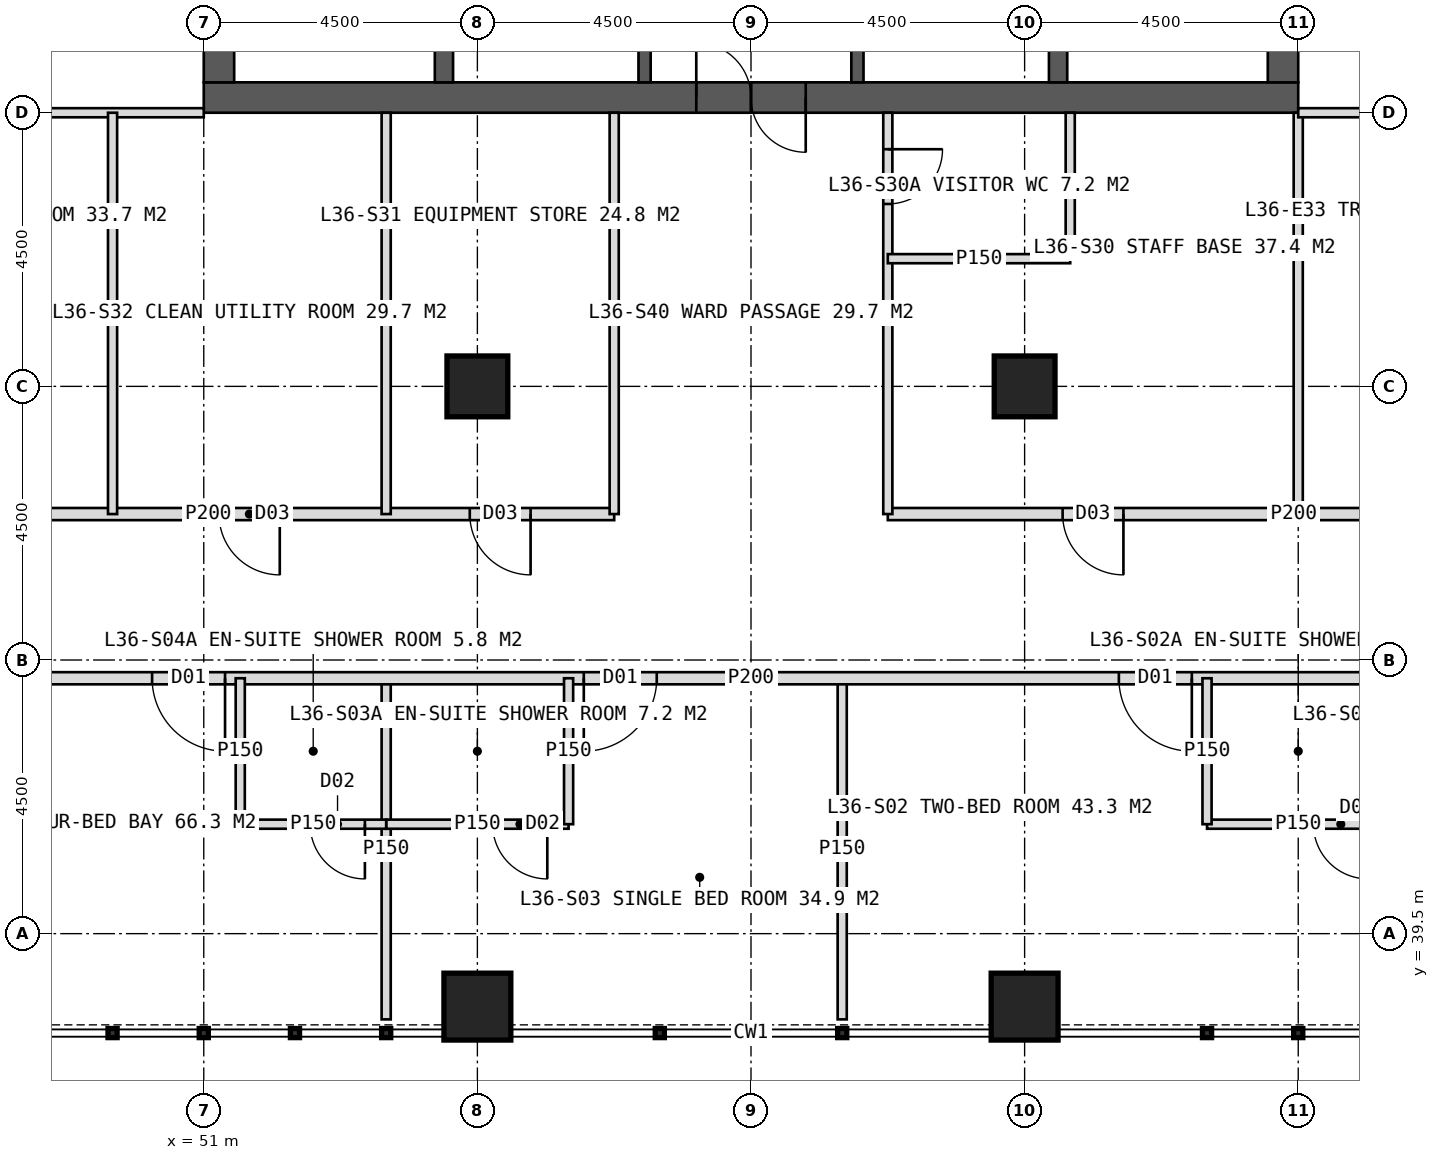
"""IFC4 building model, lengths in metres.
Left out: names, types, materials, properties, quantities, classifications, styles, units other than length and angle.
Written with IfcOpenShell. Run it as: python <this file> out.ifc"""

import sys

from ifc_helpers import new_model, si_unit, direction, frame, frame_2d, origin, origin_2d, place, context, subcontext, project, spatial, rectangle, hollow_rectangle, extrude, element, fill, save


model = new_model("IFC4")
c1 = context("Model", 3, precision=1e-05, world=origin(), true_north=direction((0.0, 1.0)))
c2 = subcontext(c1, "Body", "Model", "MODEL_VIEW")
j1 = project(units=[si_unit("LENGTHUNIT", "METRE"), si_unit("PLANEANGLEUNIT", "RADIAN")], contexts=[c1])
p1 = place(None, origin())
s1 = spatial("IfcSite", under=j1, at=p1, CompositionType="ELEMENT")
p2 = place(p1, origin())
s2 = spatial("IfcBuilding", under=s1, at=p2, CompositionType="ELEMENT")
p3 = place(p2, frame((0.0, 0.0, 152.0)))
s3 = spatial("IfcBuildingStorey", under=s2, at=p3, CompositionType="ELEMENT", Elevation=152.0)
p4 = place(p3, frame((51.0, 53.25, 0.0), z_axis=(0.0, 0.0, 1.0), x_axis=(1.0, 0.0, 0.0)))
e1 = element("IfcWall", 1, at=p4, inside=s3, PredefinedType="SHEAR", context=c2, shape_type="SweptSolid", body=[
    extrude(rectangle(XDim=18.0, YDim=0.5, at=frame_2d((9.0, 0.0))), origin(), (0.0, 0.0, 1.0), 4.0),
])
p5 = place(p4, frame((8.1, 0.0, 0.0)))
e2 = element("IfcOpeningElement", 2, at=p5, cuts=e1, PredefinedType="OPENING", context=c2, shape_type="SweptSolid", body=[
    extrude(rectangle(XDim=1.8, YDim=2.2, at=frame_2d((0.9, 1.1))), frame((0.0, 0.26, 0.0), z_axis=(0.0, -1.0, 0.0), x_axis=(1.0, 0.0, 0.0)), (0.0, 0.0, 1.0), 0.52),
])
p6 = place(p3, frame((51.25, 53.5, 0.0), z_axis=(0.0, 0.0, 1.0), x_axis=(0.0, 1.0, 0.0)))
e3 = element("IfcWall", 3, at=p6, inside=s3, PredefinedType="SHEAR", context=c2, shape_type="SweptSolid", body=[
    extrude(rectangle(XDim=17.0, YDim=0.5, at=frame_2d((8.5, 0.0))), origin(), (0.0, 0.0, 1.0), 4.0),
])
p7 = place(p6, frame((6.0, 0.0, 0.0)))
e4 = element("IfcOpeningElement", 4, at=p7, cuts=e3, PredefinedType="OPENING", context=c2, shape_type="SweptSolid", body=[
    extrude(rectangle(XDim=1.5, YDim=2.2, at=frame_2d((0.75, 1.1))), frame((0.0, 0.26, 0.0), z_axis=(0.0, -1.0, 0.0), x_axis=(1.0, 0.0, 0.0)), (0.0, 0.0, 1.0), 0.52),
])
p8 = place(p3, frame((68.75, 53.5, 0.0), z_axis=(0.0, 0.0, 1.0), x_axis=(0.0, 1.0, 0.0)))
e5 = element("IfcWall", 5, at=p8, inside=s3, PredefinedType="SHEAR", context=c2, shape_type="SweptSolid", body=[
    extrude(rectangle(XDim=17.0, YDim=0.5, at=frame_2d((8.5, 0.0))), origin(), (0.0, 0.0, 1.0), 4.0),
])
p9 = place(p8, frame((9.5, 0.0, 0.0)))
e6 = element("IfcOpeningElement", 6, at=p9, cuts=e5, PredefinedType="OPENING", context=c2, shape_type="SweptSolid", body=[
    extrude(rectangle(XDim=1.5, YDim=2.2, at=frame_2d((0.75, 1.1))), frame((0.0, 0.26, 0.0), z_axis=(0.0, -1.0, 0.0), x_axis=(1.0, 0.0, 0.0)), (0.0, 0.0, 1.0), 0.52),
])
for number, where, z_axis, x_axis in (
    (7, (54.95, 53.5, 0.0), (0.0, 0.0, 1.0), (0.0, 1.0, 0.0)),
    (8, (65.05, 53.5, 0.0), (0.0, 0.0, 1.0), (0.0, 1.0, 0.0)),
):
    element("IfcWall", number, at=place(p3, frame(where, z_axis=z_axis, x_axis=x_axis)), inside=s3, PredefinedType="SHEAR", context=c2, shape_type="SweptSolid", body=[
        extrude(rectangle(XDim=17.0, YDim=0.3, at=frame_2d((8.5, 0.0))), origin(), (0.0, 0.0, 1.0), 4.0),
    ])
p10 = place(p3, frame((58.25, 53.5, 0.0), z_axis=(0.0, 0.0, 1.0), x_axis=(0.0, 1.0, 0.0)))
e9 = element("IfcWall", 9, at=p10, inside=s3, PredefinedType="SHEAR", context=c2, shape_type="SweptSolid", body=[
    extrude(rectangle(XDim=17.0, YDim=0.2, at=frame_2d((8.5, 0.0))), origin(), (0.0, 0.0, 1.0), 4.0),
])
p11 = place(p10, frame((1.375, 0.0, 0.0)))
e10 = element("IfcOpeningElement", 10, at=p11, cuts=e9, PredefinedType="OPENING", context=c2, shape_type="SweptSolid", body=[
    extrude(rectangle(XDim=1.4, YDim=2.2, at=frame_2d((0.7, 1.1))), frame((0.0, 0.11, 0.0), z_axis=(0.0, -1.0, 0.0), x_axis=(1.0, 0.0, 0.0)), (0.0, 0.0, 1.0), 0.22),
])
p12 = place(p10, frame((5.675, 0.0, 0.0)))
e11 = element("IfcOpeningElement", 11, at=p12, cuts=e9, PredefinedType="OPENING", context=c2, shape_type="SweptSolid", body=[
    extrude(rectangle(XDim=1.4, YDim=2.2, at=frame_2d((0.7, 1.1))), frame((0.0, 0.11, 0.0), z_axis=(0.0, -1.0, 0.0), x_axis=(1.0, 0.0, 0.0)), (0.0, 0.0, 1.0), 0.22),
])
p13 = place(p3, frame((61.75, 53.5, 0.0), z_axis=(0.0, 0.0, 1.0), x_axis=(0.0, 1.0, 0.0)))
e12 = element("IfcWall", 12, at=p13, inside=s3, PredefinedType="SHEAR", context=c2, shape_type="SweptSolid", body=[
    extrude(rectangle(XDim=17.0, YDim=0.2, at=frame_2d((8.5, 0.0))), origin(), (0.0, 0.0, 1.0), 4.0),
])
p14 = place(p13, frame((1.375, 0.0, 0.0)))
e13 = element("IfcOpeningElement", 13, at=p14, cuts=e12, PredefinedType="OPENING", context=c2, shape_type="SweptSolid", body=[
    extrude(rectangle(XDim=1.4, YDim=2.2, at=frame_2d((0.7, 1.1))), frame((0.0, 0.11, 0.0), z_axis=(0.0, -1.0, 0.0), x_axis=(1.0, 0.0, 0.0)), (0.0, 0.0, 1.0), 0.22),
])
p15 = place(p13, frame((5.675, 0.0, 0.0)))
e14 = element("IfcOpeningElement", 14, at=p15, cuts=e12, PredefinedType="OPENING", context=c2, shape_type="SweptSolid", body=[
    extrude(rectangle(XDim=1.4, YDim=2.2, at=frame_2d((0.7, 1.1))), frame((0.0, 0.11, 0.0), z_axis=(0.0, -1.0, 0.0), x_axis=(1.0, 0.0, 0.0)), (0.0, 0.0, 1.0), 0.22),
])
for number, where, z_axis, x_axis in (
    (15, (55.5, 48.5, 0.0), (0.0, 0.0, 1.0), (1.0, 0.0, 0.0)),
    (16, (64.5, 48.5, 0.0), (0.0, 0.0, 1.0), (1.0, 0.0, 0.0)),
):
    element("IfcColumn", number, at=place(p3, frame(where, z_axis=z_axis, x_axis=x_axis)), inside=s3, PredefinedType="COLUMN", context=c2, shape_type="SweptSolid", body=[
        extrude(hollow_rectangle(XDim=1.0, YDim=1.0, WallThickness=0.1, at=origin_2d()), origin(), (0.0, 0.0, 1.0), 4.0),
    ])
for number, where, z_axis, x_axis in (
    (17, (55.5, 38.3, 0.0), (0.0, 0.0, 1.0), (1.0, 0.0, 0.0)),
    (18, (64.5, 38.3, 0.0), (0.0, 0.0, 1.0), (1.0, 0.0, 0.0)),
):
    element("IfcColumn", number, at=place(p3, frame(where, z_axis=z_axis, x_axis=x_axis)), inside=s3, PredefinedType="COLUMN", context=c2, shape_type="SweptSolid", body=[
        extrude(hollow_rectangle(XDim=1.1, YDim=1.1, WallThickness=0.1, at=origin_2d()), origin(), (0.0, 0.0, 1.0), 4.0),
    ])
p16 = place(p3, frame((51.0, 53.0, 0.0), z_axis=(0.0, 0.0, 1.0), x_axis=(-1.0, 0.0, 0.0)))
e19 = element("IfcWall", 19, at=p16, inside=s3, PredefinedType="PARTITIONING", context=c2, shape_type="SweptSolid", body=[
    extrude(rectangle(XDim=6.6, YDim=0.15, at=frame_2d((3.3, 0.0))), origin(), (0.0, 0.0, 1.0), 3.75),
])
for number, where, z_axis, x_axis in (
    (20, (61.5, 43.7, 0.0), (0.0, 0.0, 1.0), (0.0, -1.0, 0.0)),
    (21, (54.0, 43.7, 0.0), (0.0, 0.0, 1.0), (0.0, -1.0, 0.0)),
):
    element("IfcWall", number, at=place(p3, frame(where, z_axis=z_axis, x_axis=x_axis)), inside=s3, PredefinedType="PARTITIONING", context=c2, shape_type="SweptSolid", body=[
        extrude(rectangle(XDim=5.61, YDim=0.15, at=frame_2d((2.805, 0.0))), origin(), (0.0, 0.0, 1.0), 3.75),
    ])
p17 = place(p3, frame((78.3, 43.7, 0.0), z_axis=(0.0, 0.0, 1.0), x_axis=(-1.0, 0.0, 0.0)))
e22 = element("IfcWall", 22, at=p17, inside=s3, PredefinedType="PARTITIONING", context=c2, shape_type="SweptSolid", body=[
    extrude(rectangle(XDim=36.6, YDim=0.2, at=frame_2d((18.3, 0.0))), origin(), (0.0, 0.0, 1.0), 3.75),
])
p18 = place(p17, frame((3.35, 0.0, 0.0)))
e23 = element("IfcOpeningElement", 23, at=p18, cuts=e22, PredefinedType="OPENING", context=c2, shape_type="SweptSolid", body=[
    extrude(rectangle(XDim=1.2, YDim=2.2, at=frame_2d((0.6, 1.1))), frame((0.0, 0.11, 0.0), z_axis=(0.0, -1.0, 0.0), x_axis=(1.0, 0.0, 0.0)), (0.0, 0.0, 1.0), 0.22),
])
p19 = place(p17, frame((11.05, 0.0, 0.0)))
e24 = element("IfcOpeningElement", 24, at=p19, cuts=e22, PredefinedType="OPENING", context=c2, shape_type="SweptSolid", body=[
    extrude(rectangle(XDim=1.2, YDim=2.2, at=frame_2d((0.6, 1.1))), frame((0.0, 0.11, 0.0), z_axis=(0.0, -1.0, 0.0), x_axis=(1.0, 0.0, 0.0)), (0.0, 0.0, 1.0), 0.22),
])
p20 = place(p17, frame((19.85, 0.0, 0.0)))
e25 = element("IfcOpeningElement", 25, at=p20, cuts=e22, PredefinedType="OPENING", context=c2, shape_type="SweptSolid", body=[
    extrude(rectangle(XDim=1.2, YDim=2.2, at=frame_2d((0.6, 1.1))), frame((0.0, 0.11, 0.0), z_axis=(0.0, -1.0, 0.0), x_axis=(1.0, 0.0, 0.0)), (0.0, 0.0, 1.0), 0.22),
])
p21 = place(p17, frame((26.95, 0.0, 0.0)))
e26 = element("IfcOpeningElement", 26, at=p21, cuts=e22, PredefinedType="OPENING", context=c2, shape_type="SweptSolid", body=[
    extrude(rectangle(XDim=1.2, YDim=2.2, at=frame_2d((0.6, 1.1))), frame((0.0, 0.11, 0.0), z_axis=(0.0, -1.0, 0.0), x_axis=(1.0, 0.0, 0.0)), (0.0, 0.0, 1.0), 0.22),
])
p22 = place(p3, frame((70.5, 41.3, 0.0), z_axis=(0.0, 0.0, 1.0), x_axis=(-1.0, 0.0, 0.0)))
e27 = element("IfcWall", 27, at=p22, inside=s3, PredefinedType="PARTITIONING", context=c2, shape_type="SweptSolid", body=[
    extrude(rectangle(XDim=3.0, YDim=0.15, at=frame_2d((1.5, 0.0))), origin(), (0.0, 0.0, 1.0), 3.75),
])
p23 = place(p22, frame((0.35, 0.0, 0.0)))
e28 = element("IfcOpeningElement", 28, at=p23, cuts=e27, PredefinedType="OPENING", context=c2, shape_type="SweptSolid", body=[
    extrude(rectangle(XDim=0.9, YDim=2.1, at=frame_2d((0.45, 1.05))), frame((0.0, 0.085, 0.0), z_axis=(0.0, -1.0, 0.0), x_axis=(1.0, 0.0, 0.0)), (0.0, 0.0, 1.0), 0.17),
])
p24 = place(p3, frame((67.5, 43.7, 0.0), z_axis=(0.0, 0.0, 1.0), x_axis=(0.0, -1.0, 0.0)))
e29 = element("IfcWall", 29, at=p24, inside=s3, PredefinedType="PARTITIONING", context=c2, shape_type="SweptSolid", body=[
    extrude(rectangle(XDim=2.4, YDim=0.15, at=frame_2d((1.2, 0.0))), origin(), (0.0, 0.0, 1.0), 3.75),
])
p25 = place(p3, frame((57.0, 41.3, 0.0), z_axis=(0.0, 0.0, 1.0), x_axis=(-1.0, 0.0, 0.0)))
e30 = element("IfcWall", 30, at=p25, inside=s3, PredefinedType="PARTITIONING", context=c2, shape_type="SweptSolid", body=[
    extrude(rectangle(XDim=3.0, YDim=0.15, at=frame_2d((1.5, 0.0))), origin(), (0.0, 0.0, 1.0), 3.75),
])
p26 = place(p25, frame((0.35, 0.0, 0.0)))
e31 = element("IfcOpeningElement", 31, at=p26, cuts=e30, PredefinedType="OPENING", context=c2, shape_type="SweptSolid", body=[
    extrude(rectangle(XDim=0.9, YDim=2.1, at=frame_2d((0.45, 1.05))), frame((0.0, 0.085, 0.0), z_axis=(0.0, -1.0, 0.0), x_axis=(1.0, 0.0, 0.0)), (0.0, 0.0, 1.0), 0.17),
])
p27 = place(p3, frame((57.0, 43.7, 0.0), z_axis=(0.0, 0.0, 1.0), x_axis=(0.0, -1.0, 0.0)))
e32 = element("IfcWall", 32, at=p27, inside=s3, PredefinedType="PARTITIONING", context=c2, shape_type="SweptSolid", body=[
    extrude(rectangle(XDim=2.4, YDim=0.15, at=frame_2d((1.2, 0.0))), origin(), (0.0, 0.0, 1.0), 3.75),
])
p28 = place(p3, frame((54.0, 41.3, 0.0), z_axis=(0.0, 0.0, 1.0), x_axis=(-1.0, 0.0, 0.0)))
e33 = element("IfcWall", 33, at=p28, inside=s3, PredefinedType="PARTITIONING", context=c2, shape_type="SweptSolid", body=[
    extrude(rectangle(XDim=2.4, YDim=0.15, at=frame_2d((1.2, 0.0))), origin(), (0.0, 0.0, 1.0), 3.75),
])
p29 = place(p28, frame((0.35, 0.0, 0.0)))
e34 = element("IfcOpeningElement", 34, at=p29, cuts=e33, PredefinedType="OPENING", context=c2, shape_type="SweptSolid", body=[
    extrude(rectangle(XDim=0.9, YDim=2.1, at=frame_2d((0.45, 1.05))), frame((0.0, 0.085, 0.0), z_axis=(0.0, -1.0, 0.0), x_axis=(1.0, 0.0, 0.0)), (0.0, 0.0, 1.0), 0.17),
])
p30 = place(p3, frame((51.6, 43.7, 0.0), z_axis=(0.0, 0.0, 1.0), x_axis=(0.0, -1.0, 0.0)))
e35 = element("IfcWall", 35, at=p30, inside=s3, PredefinedType="PARTITIONING", context=c2, shape_type="SweptSolid", body=[
    extrude(rectangle(XDim=2.4, YDim=0.15, at=frame_2d((1.2, 0.0))), origin(), (0.0, 0.0, 1.0), 3.75),
])
p31 = place(p3, frame((69.0, 53.0, 0.0), z_axis=(0.0, 0.0, 1.0), x_axis=(0.0, -1.0, 0.0)))
e36 = element("IfcWall", 36, at=p31, inside=s3, PredefinedType="PARTITIONING", context=c2, shape_type="SweptSolid", body=[
    extrude(rectangle(XDim=6.6, YDim=0.15, at=frame_2d((3.3, 0.0))), origin(), (0.0, 0.0, 1.0), 3.75),
])
p32 = place(p3, frame((75.6, 46.4, 0.0), z_axis=(0.0, 0.0, 1.0), x_axis=(-1.0, 0.0, 0.0)))
e37 = element("IfcWall", 37, at=p32, inside=s3, PredefinedType="PARTITIONING", context=c2, shape_type="SweptSolid", body=[
    extrude(rectangle(XDim=13.35, YDim=0.2, at=frame_2d((6.675, 0.0))), origin(), (0.0, 0.0, 1.0), 3.75),
])
p33 = place(p32, frame((9.475, 0.0, 0.0)))
e38 = element("IfcOpeningElement", 38, at=p33, cuts=e37, PredefinedType="OPENING", context=c2, shape_type="SweptSolid", body=[
    extrude(rectangle(XDim=1.0, YDim=2.1, at=frame_2d((0.5, 1.05))), frame((0.0, 0.11, 0.0), z_axis=(0.0, -1.0, 0.0), x_axis=(1.0, 0.0, 0.0)), (0.0, 0.0, 1.0), 0.22),
])
p34 = place(p3, frame((57.75, 46.4, 0.0), z_axis=(0.0, 0.0, 1.0), x_axis=(-1.0, 0.0, 0.0)))
e39 = element("IfcWall", 39, at=p34, inside=s3, PredefinedType="PARTITIONING", context=c2, shape_type="SweptSolid", body=[
    extrude(rectangle(XDim=13.35, YDim=0.2, at=frame_2d((6.675, 0.0))), origin(), (0.0, 0.0, 1.0), 3.75),
])
p35 = place(p34, frame((1.375, 0.0, 0.0)))
e40 = element("IfcOpeningElement", 40, at=p35, cuts=e39, PredefinedType="OPENING", context=c2, shape_type="SweptSolid", body=[
    extrude(rectangle(XDim=1.0, YDim=2.1, at=frame_2d((0.5, 1.05))), frame((0.0, 0.11, 0.0), z_axis=(0.0, -1.0, 0.0), x_axis=(1.0, 0.0, 0.0)), (0.0, 0.0, 1.0), 0.22),
])
p36 = place(p34, frame((5.5, 0.0, 0.0)))
e41 = element("IfcOpeningElement", 41, at=p36, cuts=e39, PredefinedType="OPENING", context=c2, shape_type="SweptSolid", body=[
    extrude(rectangle(XDim=1.0, YDim=2.1, at=frame_2d((0.5, 1.05))), frame((0.0, 0.11, 0.0), z_axis=(0.0, -1.0, 0.0), x_axis=(1.0, 0.0, 0.0)), (0.0, 0.0, 1.0), 0.22),
])
p37 = place(p34, frame((10.3, 0.0, 0.0)))
e42 = element("IfcOpeningElement", 42, at=p37, cuts=e39, PredefinedType="OPENING", context=c2, shape_type="SweptSolid", body=[
    extrude(rectangle(XDim=1.0, YDim=2.1, at=frame_2d((0.5, 1.05))), frame((0.0, 0.11, 0.0), z_axis=(0.0, -1.0, 0.0), x_axis=(1.0, 0.0, 0.0)), (0.0, 0.0, 1.0), 0.22),
])
p38 = place(p3, frame((62.25, 53.0, 0.0), z_axis=(0.0, 0.0, 1.0), x_axis=(0.0, -1.0, 0.0)))
e43 = element("IfcWall", 43, at=p38, inside=s3, PredefinedType="PARTITIONING", context=c2, shape_type="SweptSolid", body=[
    extrude(rectangle(XDim=6.6, YDim=0.15, at=frame_2d((3.3, 0.0))), origin(), (0.0, 0.0, 1.0), 3.75),
])
p39 = place(p38, frame((0.6, 0.0, 0.0)))
e44 = element("IfcOpeningElement", 44, at=p39, cuts=e43, PredefinedType="OPENING", context=c2, shape_type="SweptSolid", body=[
    extrude(rectangle(XDim=0.9, YDim=2.1, at=frame_2d((0.45, 1.05))), frame((0.0, 0.085, 0.0), z_axis=(0.0, -1.0, 0.0), x_axis=(1.0, 0.0, 0.0)), (0.0, 0.0, 1.0), 0.17),
])
for number, where, z_axis, x_axis in (
    (45, (57.75, 53.0, 0.0), (0.0, 0.0, 1.0), (0.0, -1.0, 0.0)),
    (46, (54.0, 53.0, 0.0), (0.0, 0.0, 1.0), (0.0, -1.0, 0.0)),
    (47, (49.5, 53.0, 0.0), (0.0, 0.0, 1.0), (0.0, -1.0, 0.0)),
):
    element("IfcWall", number, at=place(p3, frame(where, z_axis=z_axis, x_axis=x_axis)), inside=s3, PredefinedType="PARTITIONING", context=c2, shape_type="SweptSolid", body=[
        extrude(rectangle(XDim=6.6, YDim=0.15, at=frame_2d((3.3, 0.0))), origin(), (0.0, 0.0, 1.0), 3.75),
    ])
p40 = place(p3, frame((65.25, 50.6, 0.0), z_axis=(0.0, 0.0, 1.0), x_axis=(-1.0, 0.0, 0.0)))
e48 = element("IfcWall", 48, at=p40, inside=s3, PredefinedType="PARTITIONING", context=c2, shape_type="SweptSolid", body=[
    extrude(rectangle(XDim=3.0, YDim=0.15, at=frame_2d((1.5, 0.0))), origin(), (0.0, 0.0, 1.0), 3.75),
])
p41 = place(p3, frame((65.25, 53.0, 0.0), z_axis=(0.0, 0.0, 1.0), x_axis=(0.0, -1.0, 0.0)))
e49 = element("IfcWall", 49, at=p41, inside=s3, PredefinedType="PARTITIONING", context=c2, shape_type="SweptSolid", body=[
    extrude(rectangle(XDim=2.4, YDim=0.15, at=frame_2d((1.2, 0.0))), origin(), (0.0, 0.0, 1.0), 3.75),
])
p42 = place(p3, frame((69.0, 53.0, 0.0), z_axis=(0.0, 0.0, 1.0), x_axis=(1.0, 0.0, 0.0)))
e50 = element("IfcWall", 50, at=p42, inside=s3, PredefinedType="PARTITIONING", context=c2, shape_type="SweptSolid", body=[
    extrude(rectangle(XDim=6.6, YDim=0.15, at=frame_2d((3.3, 0.0))), origin(), (0.0, 0.0, 1.0), 3.75),
])
p43 = place(p19, origin())
e51 = element("IfcDoor", 51, at=p43, inside=s3, OperationType="SINGLE_SWING_LEFT", PredefinedType="DOOR", context=c2, shape_type="SweptSolid", body=[
    extrude(rectangle(XDim=1.2, YDim=2.2, at=frame_2d((0.6, 1.1))), frame((0.0, 0.025, 0.0), z_axis=(0.0, -1.0, 0.0), x_axis=(1.0, 0.0, 0.0)), (0.0, 0.0, 1.0), 0.05),
])
fill(e24, e51)
p44 = place(p23, origin())
e52 = element("IfcDoor", 52, at=p44, inside=s3, OperationType="SINGLE_SWING_LEFT", PredefinedType="DOOR", context=c2, shape_type="SweptSolid", body=[
    extrude(rectangle(XDim=0.9, YDim=2.1, at=frame_2d((0.45, 1.05))), frame((0.0, 0.025, 0.0), z_axis=(0.0, -1.0, 0.0), x_axis=(1.0, 0.0, 0.0)), (0.0, 0.0, 1.0), 0.05),
])
fill(e28, e52)
p45 = place(p20, origin())
e53 = element("IfcDoor", 53, at=p45, inside=s3, OperationType="SINGLE_SWING_RIGHT", PredefinedType="DOOR", context=c2, shape_type="SweptSolid", body=[
    extrude(rectangle(XDim=1.2, YDim=2.2, at=frame_2d((0.6, 1.1))), frame((0.0, 0.025, 0.0), z_axis=(0.0, -1.0, 0.0), x_axis=(1.0, 0.0, 0.0)), (0.0, 0.0, 1.0), 0.05),
])
fill(e25, e53)
p46 = place(p26, origin())
e54 = element("IfcDoor", 54, at=p46, inside=s3, OperationType="SINGLE_SWING_LEFT", PredefinedType="DOOR", context=c2, shape_type="SweptSolid", body=[
    extrude(rectangle(XDim=0.9, YDim=2.1, at=frame_2d((0.45, 1.05))), frame((0.0, 0.025, 0.0), z_axis=(0.0, -1.0, 0.0), x_axis=(1.0, 0.0, 0.0)), (0.0, 0.0, 1.0), 0.05),
])
fill(e31, e54)
p47 = place(p21, origin())
e55 = element("IfcDoor", 55, at=p47, inside=s3, OperationType="SINGLE_SWING_LEFT", PredefinedType="DOOR", context=c2, shape_type="SweptSolid", body=[
    extrude(rectangle(XDim=1.2, YDim=2.2, at=frame_2d((0.6, 1.1))), frame((0.0, 0.025, 0.0), z_axis=(0.0, -1.0, 0.0), x_axis=(1.0, 0.0, 0.0)), (0.0, 0.0, 1.0), 0.05),
])
fill(e26, e55)
p48 = place(p29, origin())
e56 = element("IfcDoor", 56, at=p48, inside=s3, OperationType="SINGLE_SWING_LEFT", PredefinedType="DOOR", context=c2, shape_type="SweptSolid", body=[
    extrude(rectangle(XDim=0.9, YDim=2.1, at=frame_2d((0.45, 1.05))), frame((0.0, 0.025, 0.0), z_axis=(0.0, -1.0, 0.0), x_axis=(1.0, 0.0, 0.0)), (0.0, 0.0, 1.0), 0.05),
])
fill(e34, e56)
p49 = place(p39, origin())
e57 = element("IfcDoor", 57, at=p49, inside=s3, OperationType="SINGLE_SWING_LEFT", PredefinedType="DOOR", context=c2, shape_type="SweptSolid", body=[
    extrude(rectangle(XDim=0.9, YDim=2.1, at=frame_2d((0.45, 1.05))), frame((0.0, 0.025, 0.0), z_axis=(0.0, -1.0, 0.0), x_axis=(1.0, 0.0, 0.0)), (0.0, 0.0, 1.0), 0.05),
])
fill(e44, e57)
p50 = place(p33, origin())
e58 = element("IfcDoor", 58, at=p50, inside=s3, OperationType="SINGLE_SWING_LEFT", PredefinedType="DOOR", context=c2, shape_type="SweptSolid", body=[
    extrude(rectangle(XDim=1.0, YDim=2.1, at=frame_2d((0.5, 1.05))), frame((0.0, 0.025, 0.0), z_axis=(0.0, -1.0, 0.0), x_axis=(1.0, 0.0, 0.0)), (0.0, 0.0, 1.0), 0.05),
])
fill(e38, e58)
p51 = place(p35, origin())
e59 = element("IfcDoor", 59, at=p51, inside=s3, OperationType="SINGLE_SWING_LEFT", PredefinedType="DOOR", context=c2, shape_type="SweptSolid", body=[
    extrude(rectangle(XDim=1.0, YDim=2.1, at=frame_2d((0.5, 1.05))), frame((0.0, 0.025, 0.0), z_axis=(0.0, -1.0, 0.0), x_axis=(1.0, 0.0, 0.0)), (0.0, 0.0, 1.0), 0.05),
])
fill(e40, e59)
p52 = place(p36, origin())
e60 = element("IfcDoor", 60, at=p52, inside=s3, OperationType="SINGLE_SWING_LEFT", PredefinedType="DOOR", context=c2, shape_type="SweptSolid", body=[
    extrude(rectangle(XDim=1.0, YDim=2.1, at=frame_2d((0.5, 1.05))), frame((0.0, 0.025, 0.0), z_axis=(0.0, -1.0, 0.0), x_axis=(1.0, 0.0, 0.0)), (0.0, 0.0, 1.0), 0.05),
])
fill(e41, e60)
p53 = place(p5, origin())
e61 = element("IfcDoor", 61, at=p53, inside=s3, OperationType="DOUBLE_DOOR_SINGLE_SWING", PredefinedType="DOOR", context=c2, shape_type="SweptSolid", body=[
    extrude(rectangle(XDim=1.8, YDim=2.2, at=frame_2d((0.9, 1.1))), frame((0.0, 0.025, 0.0), z_axis=(0.0, -1.0, 0.0), x_axis=(1.0, 0.0, 0.0)), (0.0, 0.0, 1.0), 0.05),
])
fill(e2, e61)
save(model, sys.argv[1])
